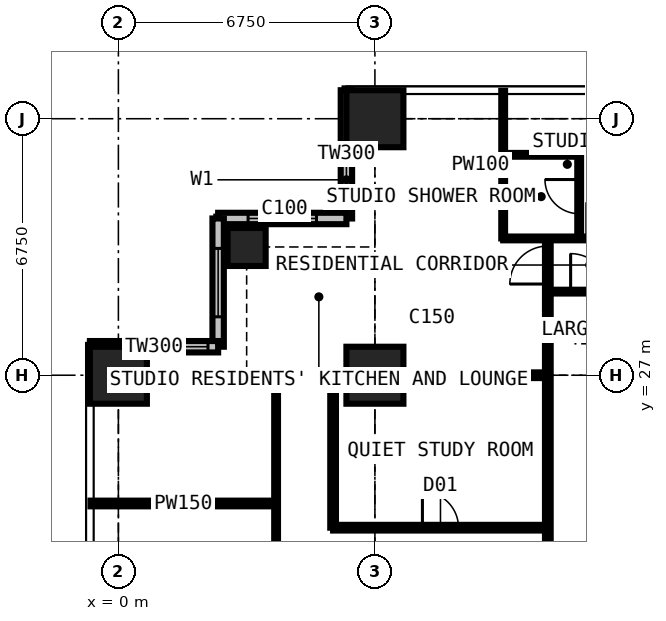
"""IFC4 building model, lengths in metres.
Left out: names, types, materials, properties, quantities, classifications, styles, units other than length and angle.
Written with IfcOpenShell. Run it as: python <this file> out.ifc"""

import sys

from ifc_helpers import new_model, si_unit, direction, frame, frame_2d, origin, origin_2d, place, context, subcontext, project, spatial, rectangle, extrude, element, fill, save


model = new_model("IFC4")
c1 = context("Model", 3, precision=1e-05, world=origin(), true_north=direction((0.0, 1.0)))
c2 = subcontext(c1, "Body", "Model", "MODEL_VIEW")
j1 = project(units=[si_unit("LENGTHUNIT", "METRE"), si_unit("PLANEANGLEUNIT", "RADIAN")], contexts=[c1])
p1 = place(None, origin())
s1 = spatial("IfcSite", under=j1, at=p1, CompositionType="ELEMENT")
p2 = place(p1, origin())
s2 = spatial("IfcBuilding", under=s1, at=p2, CompositionType="ELEMENT")
p3 = place(p2, frame((0.0, 0.0, 112.5)))
s3 = spatial("IfcBuildingStorey", under=s2, at=p3, CompositionType="ELEMENT", Elevation=112.5)
p4 = place(p3, frame((0.0, 27.0, 0.0), z_axis=(0.0, 0.0, 1.0), x_axis=(1.0, 0.0, 0.0)))
e1 = element("IfcColumn", 1, at=p4, inside=s3, PredefinedType="COLUMN", context=c2, shape_type="SweptSolid", body=[
    extrude(rectangle(XDim=1.5, YDim=1.5, at=origin_2d()), origin(), (0.0, 0.0, 1.0), 3.6),
])
p5 = place(p3, frame((3.375, 30.375, 0.0), z_axis=(0.0, 0.0, 1.0), x_axis=(1.0, 0.0, 0.0)))
e2 = element("IfcColumn", 2, at=p5, inside=s3, PredefinedType="COLUMN", context=c2, shape_type="SweptSolid", body=[
    extrude(rectangle(XDim=1.0, YDim=1.0, at=origin_2d()), origin(), (0.0, 0.0, 1.0), 3.6),
])
for number, where, z_axis, x_axis in (
    (3, (6.75, 27.0, 0.0), (0.0, 0.0, 1.0), (1.0, 0.0, 0.0)),
    (4, (6.75, 33.75, 0.0), (0.0, 0.0, 1.0), (1.0, 0.0, 0.0)),
):
    element("IfcColumn", number, at=place(p3, frame(where, z_axis=z_axis, x_axis=x_axis)), inside=s3, PredefinedType="COLUMN", context=c2, shape_type="SweptSolid", body=[
        extrude(rectangle(XDim=1.5, YDim=1.5, at=origin_2d()), origin(), (0.0, 0.0, 1.0), 3.6),
    ])
p6 = place(p3, frame((6.0, 34.5, 0.0), z_axis=(0.0, 0.0, 1.0), x_axis=(0.0, -1.0, 0.0)))
e5 = element("IfcWall", 5, at=p6, inside=s3, PredefinedType="SOLIDWALL", context=c2, shape_type="SweptSolid", body=[
    extrude(rectangle(XDim=3.375, YDim=0.3, at=frame_2d((1.688, 0.0))), origin(), (0.0, 0.0, 1.0), 3.375),
])
p7 = place(p6, frame((1.607, 0.0, 0.9)))
e6 = element("IfcOpeningElement", 6, at=p7, cuts=e5, PredefinedType="OPENING", context=c2, shape_type="SweptSolid", body=[
    extrude(rectangle(XDim=1.5, YDim=1.8, at=frame_2d((0.75, 0.9))), frame((0.0, 0.16, 0.0), z_axis=(0.0, -1.0, 0.0), x_axis=(1.0, 0.0, 0.0)), (0.0, 0.0, 1.0), 0.32),
])
p8 = place(p3, frame((6.0, 31.125, 0.0), z_axis=(0.0, 0.0, 1.0), x_axis=(-1.0, 0.0, 0.0)))
e7 = element("IfcWall", 7, at=p8, inside=s3, PredefinedType="SOLIDWALL", context=c2, shape_type="SweptSolid", body=[
    extrude(rectangle(XDim=3.375, YDim=0.3, at=frame_2d((1.688, 0.0))), origin(), (0.0, 0.0, 1.0), 3.375),
])
p9 = place(p8, frame((0.788, 0.0, 0.6)))
e8 = element("IfcOpeningElement", 8, at=p9, cuts=e7, PredefinedType="OPENING", context=c2, shape_type="SweptSolid", body=[
    extrude(rectangle(XDim=1.8, YDim=2.1, at=frame_2d((0.9, 1.05))), frame((0.0, 0.16, 0.0), z_axis=(0.0, -1.0, 0.0), x_axis=(1.0, 0.0, 0.0)), (0.0, 0.0, 1.0), 0.32),
])
p10 = place(p3, frame((2.625, 31.125, 0.0), z_axis=(0.0, 0.0, 1.0), x_axis=(0.0, -1.0, 0.0)))
e9 = element("IfcWall", 9, at=p10, inside=s3, PredefinedType="SOLIDWALL", context=c2, shape_type="SweptSolid", body=[
    extrude(rectangle(XDim=3.375, YDim=0.3, at=frame_2d((1.688, 0.0))), origin(), (0.0, 0.0, 1.0), 3.375),
])
p11 = place(p10, frame((0.788, 0.0, 0.6)))
e10 = element("IfcOpeningElement", 10, at=p11, cuts=e9, PredefinedType="OPENING", context=c2, shape_type="SweptSolid", body=[
    extrude(rectangle(XDim=1.8, YDim=2.1, at=frame_2d((0.9, 1.05))), frame((0.0, 0.16, 0.0), z_axis=(0.0, -1.0, 0.0), x_axis=(1.0, 0.0, 0.0)), (0.0, 0.0, 1.0), 0.32),
])
p12 = place(p3, frame((2.625, 27.75, 0.0), z_axis=(0.0, 0.0, 1.0), x_axis=(-1.0, 0.0, 0.0)))
e11 = element("IfcWall", 11, at=p12, inside=s3, PredefinedType="SOLIDWALL", context=c2, shape_type="SweptSolid", body=[
    extrude(rectangle(XDim=3.375, YDim=0.3, at=frame_2d((1.688, 0.0))), origin(), (0.0, 0.0, 1.0), 3.375),
])
p13 = place(p12, frame((0.268, 0.0, 0.9)))
e12 = element("IfcOpeningElement", 12, at=p13, cuts=e11, PredefinedType="OPENING", context=c2, shape_type="SweptSolid", body=[
    extrude(rectangle(XDim=1.5, YDim=1.8, at=frame_2d((0.75, 0.9))), frame((0.0, 0.16, 0.0), z_axis=(0.0, -1.0, 0.0), x_axis=(1.0, 0.0, 0.0)), (0.0, 0.0, 1.0), 0.32),
])
p14 = place(p3, frame((-0.734, 23.625, 0.0), z_axis=(0.0, 0.0, 1.0), x_axis=(1.0, 0.0, 0.0)))
e13 = element("IfcWall", 13, at=p14, inside=s3, PredefinedType="PARTITIONING", context=c2, shape_type="SweptSolid", body=[
    extrude(rectangle(XDim=4.884, YDim=0.15, at=frame_2d((2.442, 0.0))), origin(), (0.0, 0.0, 1.0), 3.375),
])
p15 = place(p3, frame((4.15, 10.125, 0.0), z_axis=(0.0, 0.0, 1.0), x_axis=(0.0, 1.0, 0.0)))
e14 = element("IfcWall", 14, at=p15, inside=s3, PredefinedType="PARTITIONING", context=c2, shape_type="SweptSolid", body=[
    extrude(rectangle(XDim=16.875, YDim=0.1, at=frame_2d((8.438, 0.0))), origin(), (0.0, 0.0, 1.0), 3.375),
])
p16 = place(p15, frame((4.2, 0.0, 0.0)))
e15 = element("IfcOpeningElement", 15, at=p16, cuts=e14, PredefinedType="OPENING", context=c2, shape_type="SweptSolid", body=[
    extrude(rectangle(XDim=0.95, YDim=2.2, at=frame_2d((0.475, 1.1))), frame((0.0, 0.06, 0.0), z_axis=(0.0, -1.0, 0.0), x_axis=(1.0, 0.0, 0.0)), (0.0, 0.0, 1.0), 0.12),
])
p17 = place(p15, frame((10.95, 0.0, 0.0)))
e16 = element("IfcOpeningElement", 16, at=p17, cuts=e14, PredefinedType="OPENING", context=c2, shape_type="SweptSolid", body=[
    extrude(rectangle(XDim=0.95, YDim=2.2, at=frame_2d((0.475, 1.1))), frame((0.0, 0.06, 0.0), z_axis=(0.0, -1.0, 0.0), x_axis=(1.0, 0.0, 0.0)), (0.0, 0.0, 1.0), 0.12),
])
p18 = place(p3, frame((4.15, 27.0, 0.0), z_axis=(0.0, 0.0, 1.0), x_axis=(1.0, 0.0, 0.0)))
e17 = element("IfcWall", 17, at=p18, inside=s3, PredefinedType="PARTITIONING", context=c2, shape_type="SweptSolid", body=[
    extrude(rectangle(XDim=7.15, YDim=0.15, at=frame_2d((3.575, 0.0))), origin(), (0.0, 0.0, 1.0), 2.806),
])
p19 = place(p3, frame((5.65, 22.988, 0.0), z_axis=(0.0, 0.0, 1.0), x_axis=(0.0, 1.0, 0.0)))
e18 = element("IfcWall", 18, at=p19, inside=s3, PredefinedType="PARTITIONING", context=c2, shape_type="SweptSolid", body=[
    extrude(rectangle(XDim=4.012, YDim=0.15, at=frame_2d((2.006, 0.0))), origin(), (0.0, 0.0, 1.0), 3.375),
])
p20 = place(p3, frame((5.65, 22.988, 0.0), z_axis=(0.0, 0.0, 1.0), x_axis=(1.0, 0.0, 0.0)))
e19 = element("IfcWall", 19, at=p20, inside=s3, PredefinedType="PARTITIONING", context=c2, shape_type="SweptSolid", body=[
    extrude(rectangle(XDim=5.65, YDim=0.15, at=frame_2d((2.825, 0.0))), origin(), (0.0, 0.0, 1.0), 3.375),
])
p21 = place(p20, frame((2.35, 0.0, 0.0)))
e20 = element("IfcOpeningElement", 20, at=p21, cuts=e19, PredefinedType="OPENING", context=c2, shape_type="SweptSolid", body=[
    extrude(rectangle(XDim=0.95, YDim=2.2, at=frame_2d((0.475, 1.1))), frame((0.0, 0.085, 0.0), z_axis=(0.0, -1.0, 0.0), x_axis=(1.0, 0.0, 0.0)), (0.0, 0.0, 1.0), 0.17),
])
p22 = place(p3, frame((10.125, 30.6, 0.0), z_axis=(0.0, 0.0, 1.0), x_axis=(0.0, 1.0, 0.0)))
e21 = element("IfcWall", 21, at=p22, inside=s3, PredefinedType="PARTITIONING", context=c2, shape_type="SweptSolid", body=[
    extrude(rectangle(XDim=3.884, YDim=0.1, at=frame_2d((1.942, 0.0))), origin(), (0.0, 0.0, 1.0), 3.375),
])
p23 = place(p3, frame((10.125, 30.6, 0.0), z_axis=(0.0, 0.0, 1.0), x_axis=(1.0, 0.0, 0.0)))
e22 = element("IfcWall", 22, at=p23, inside=s3, PredefinedType="PARTITIONING", context=c2, shape_type="SweptSolid", body=[
    extrude(rectangle(XDim=3.375, YDim=0.1, at=frame_2d((1.688, 0.0))), origin(), (0.0, 0.0, 1.0), 3.375),
])
p24 = place(p23, frame((2.2, 0.0, 0.0)))
e23 = element("IfcOpeningElement", 23, at=p24, cuts=e22, PredefinedType="OPENING", context=c2, shape_type="SweptSolid", body=[
    extrude(rectangle(XDim=0.95, YDim=2.2, at=frame_2d((0.475, 1.1))), frame((0.0, 0.06, 0.0), z_axis=(0.0, -1.0, 0.0), x_axis=(1.0, 0.0, 0.0)), (0.0, 0.0, 1.0), 0.12),
])
p25 = place(p3, frame((10.125, 32.8, 0.0), z_axis=(0.0, 0.0, 1.0), x_axis=(1.0, 0.0, 0.0)))
e24 = element("IfcWall", 24, at=p25, inside=s3, PredefinedType="PARTITIONING", context=c2, shape_type="SweptSolid", body=[
    extrude(rectangle(XDim=2.0, YDim=0.1, at=frame_2d((1.0, 0.0))), origin(), (0.0, 0.0, 1.0), 3.375),
])
p26 = place(p3, frame((11.3, 11.3, 0.0), z_axis=(0.0, 0.0, 1.0), x_axis=(0.0, 1.0, 0.0)))
e25 = element("IfcWall", 25, at=p26, inside=s3, PredefinedType="PARTITIONING", context=c2, shape_type="SweptSolid", body=[
    extrude(rectangle(XDim=19.3, YDim=0.15, at=frame_2d((9.65, 0.0))), origin(), (0.0, 0.0, 1.0), 3.375),
])
p27 = place(p26, frame((18.1, 0.0, 0.0)))
e26 = element("IfcOpeningElement", 26, at=p27, cuts=e25, PredefinedType="OPENING", context=c2, shape_type="SweptSolid", body=[
    extrude(rectangle(XDim=1.0, YDim=2.2, at=frame_2d((0.5, 1.1))), frame((0.0, 0.085, 0.0), z_axis=(0.0, -1.0, 0.0), x_axis=(1.0, 0.0, 0.0)), (0.0, 0.0, 1.0), 0.17),
])
p28 = place(p26, frame((10.137, 0.0, 0.0)))
e27 = element("IfcOpeningElement", 27, at=p28, cuts=e25, PredefinedType="OPENING", context=c2, shape_type="SweptSolid", body=[
    extrude(rectangle(XDim=1.0, YDim=2.2, at=frame_2d((0.5, 1.1))), frame((0.0, 0.085, 0.0), z_axis=(0.0, -1.0, 0.0), x_axis=(1.0, 0.0, 0.0)), (0.0, 0.0, 1.0), 0.17),
])
p29 = place(p3, frame((11.3, 29.2, 0.0), z_axis=(0.0, 0.0, 1.0), x_axis=(1.0, 0.0, 0.0)))
e28 = element("IfcWall", 28, at=p29, inside=s3, PredefinedType="PARTITIONING", context=c2, shape_type="SweptSolid", body=[
    extrude(rectangle(XDim=19.075, YDim=0.1, at=frame_2d((9.538, 0.0))), origin(), (0.0, 0.0, 1.0), 3.375),
])
p30 = place(p29, frame((6.4, 0.0, 0.0)))
e29 = element("IfcOpeningElement", 29, at=p30, cuts=e28, PredefinedType="OPENING", context=c2, shape_type="SweptSolid", body=[
    extrude(rectangle(XDim=0.95, YDim=2.2, at=frame_2d((0.475, 1.1))), frame((0.0, 0.06, 0.0), z_axis=(0.0, -1.0, 0.0), x_axis=(1.0, 0.0, 0.0)), (0.0, 0.0, 1.0), 0.12),
])
p31 = place(p29, frame((13.15, 0.0, 0.0)))
e30 = element("IfcOpeningElement", 30, at=p31, cuts=e28, PredefinedType="OPENING", context=c2, shape_type="SweptSolid", body=[
    extrude(rectangle(XDim=0.95, YDim=2.2, at=frame_2d((0.475, 1.1))), frame((0.0, 0.06, 0.0), z_axis=(0.0, -1.0, 0.0), x_axis=(1.0, 0.0, 0.0)), (0.0, 0.0, 1.0), 0.12),
])
p32 = place(p29, frame((15.95, 0.0, 0.0)))
e31 = element("IfcOpeningElement", 31, at=p32, cuts=e28, PredefinedType="OPENING", context=c2, shape_type="SweptSolid", body=[
    extrude(rectangle(XDim=0.95, YDim=2.2, at=frame_2d((0.475, 1.1))), frame((0.0, 0.06, 0.0), z_axis=(0.0, -1.0, 0.0), x_axis=(1.0, 0.0, 0.0)), (0.0, 0.0, 1.0), 0.12),
])
p33 = place(p29, frame((0.6, 0.0, 0.0)))
e32 = element("IfcOpeningElement", 32, at=p33, cuts=e28, PredefinedType="OPENING", context=c2, shape_type="SweptSolid", body=[
    extrude(rectangle(XDim=1.0, YDim=2.2, at=frame_2d((0.5, 1.1))), frame((0.0, 0.06, 0.0), z_axis=(0.0, -1.0, 0.0), x_axis=(1.0, 0.0, 0.0)), (0.0, 0.0, 1.0), 0.12),
])
p34 = place(p3, frame((12.125, 30.6, 0.0), z_axis=(0.0, 0.0, 1.0), x_axis=(0.0, 1.0, 0.0)))
e33 = element("IfcWall", 33, at=p34, inside=s3, PredefinedType="PARTITIONING", context=c2, shape_type="SweptSolid", body=[
    extrude(rectangle(XDim=2.2, YDim=0.1, at=frame_2d((1.1, 0.0))), origin(), (0.0, 0.0, 1.0), 3.375),
])
p35 = place(p34, frame((0.65, 0.0, 0.0)))
e34 = element("IfcOpeningElement", 34, at=p35, cuts=e33, PredefinedType="OPENING", context=c2, shape_type="SweptSolid", body=[
    extrude(rectangle(XDim=0.9, YDim=2.2, at=frame_2d((0.45, 1.1))), frame((0.0, 0.06, 0.0), z_axis=(0.0, -1.0, 0.0), x_axis=(1.0, 0.0, 0.0)), (0.0, 0.0, 1.0), 0.12),
])
p36 = place(p7, origin())
e35 = element("IfcWindow", 35, at=p36, inside=s3, PartitioningType="SINGLE_PANEL", PredefinedType="WINDOW", context=c2, shape_type="SweptSolid", body=[
    extrude(rectangle(XDim=1.5, YDim=1.8, at=frame_2d((0.75, 0.9))), frame((0.0, 0.03, 0.0), z_axis=(0.0, -1.0, 0.0), x_axis=(1.0, 0.0, 0.0)), (0.0, 0.0, 1.0), 0.06),
])
fill(e6, e35)
p37 = place(p9, origin())
e36 = element("IfcWindow", 36, at=p37, inside=s3, PartitioningType="SINGLE_PANEL", PredefinedType="WINDOW", context=c2, shape_type="SweptSolid", body=[
    extrude(rectangle(XDim=1.8, YDim=2.1, at=frame_2d((0.9, 1.05))), frame((0.0, 0.03, 0.0), z_axis=(0.0, -1.0, 0.0), x_axis=(1.0, 0.0, 0.0)), (0.0, 0.0, 1.0), 0.06),
])
fill(e8, e36)
p38 = place(p11, origin())
e37 = element("IfcWindow", 37, at=p38, inside=s3, PartitioningType="SINGLE_PANEL", PredefinedType="WINDOW", context=c2, shape_type="SweptSolid", body=[
    extrude(rectangle(XDim=1.8, YDim=2.1, at=frame_2d((0.9, 1.05))), frame((0.0, 0.03, 0.0), z_axis=(0.0, -1.0, 0.0), x_axis=(1.0, 0.0, 0.0)), (0.0, 0.0, 1.0), 0.06),
])
fill(e10, e37)
p39 = place(p13, origin())
e38 = element("IfcWindow", 38, at=p39, inside=s3, PartitioningType="SINGLE_PANEL", PredefinedType="WINDOW", context=c2, shape_type="SweptSolid", body=[
    extrude(rectangle(XDim=1.5, YDim=1.8, at=frame_2d((0.75, 0.9))), frame((0.0, 0.03, 0.0), z_axis=(0.0, -1.0, 0.0), x_axis=(1.0, 0.0, 0.0)), (0.0, 0.0, 1.0), 0.06),
])
fill(e12, e38)
p40 = place(p35, origin())
e39 = element("IfcDoor", 39, at=p40, inside=s3, OperationType="SINGLE_SWING_RIGHT", PredefinedType="DOOR", context=c2, shape_type="SweptSolid", body=[
    extrude(rectangle(XDim=0.9, YDim=2.2, at=frame_2d((0.45, 1.1))), frame((0.0, 0.025, 0.0), z_axis=(0.0, -1.0, 0.0), x_axis=(1.0, 0.0, 0.0)), (0.0, 0.0, 1.0), 0.05),
])
fill(e34, e39)
p41 = place(p33, origin())
e40 = element("IfcDoor", 40, at=p41, inside=s3, OperationType="SINGLE_SWING_LEFT", PredefinedType="DOOR", context=c2, shape_type="SweptSolid", body=[
    extrude(rectangle(XDim=1.0, YDim=2.2, at=frame_2d((0.5, 1.1))), frame((0.0, 0.025, 0.0), z_axis=(0.0, -1.0, 0.0), x_axis=(1.0, 0.0, 0.0)), (0.0, 0.0, 1.0), 0.05),
])
fill(e32, e40)
p42 = place(p27, origin())
e41 = element("IfcDoor", 41, at=p42, inside=s3, OperationType="SINGLE_SWING_LEFT", PredefinedType="DOOR", context=c2, shape_type="SweptSolid", body=[
    extrude(rectangle(XDim=1.0, YDim=2.2, at=frame_2d((0.5, 1.1))), frame((0.0, 0.025, 0.0), z_axis=(0.0, -1.0, 0.0), x_axis=(1.0, 0.0, 0.0)), (0.0, 0.0, 1.0), 0.05),
])
fill(e26, e41)
p43 = place(p21, origin())
e42 = element("IfcDoor", 42, at=p43, inside=s3, OperationType="SINGLE_SWING_LEFT", PredefinedType="DOOR", context=c2, shape_type="SweptSolid", body=[
    extrude(rectangle(XDim=0.95, YDim=2.2, at=frame_2d((0.475, 1.1))), frame((0.0, 0.025, 0.0), z_axis=(0.0, -1.0, 0.0), x_axis=(1.0, 0.0, 0.0)), (0.0, 0.0, 1.0), 0.05),
])
fill(e20, e42)
save(model, sys.argv[1])
